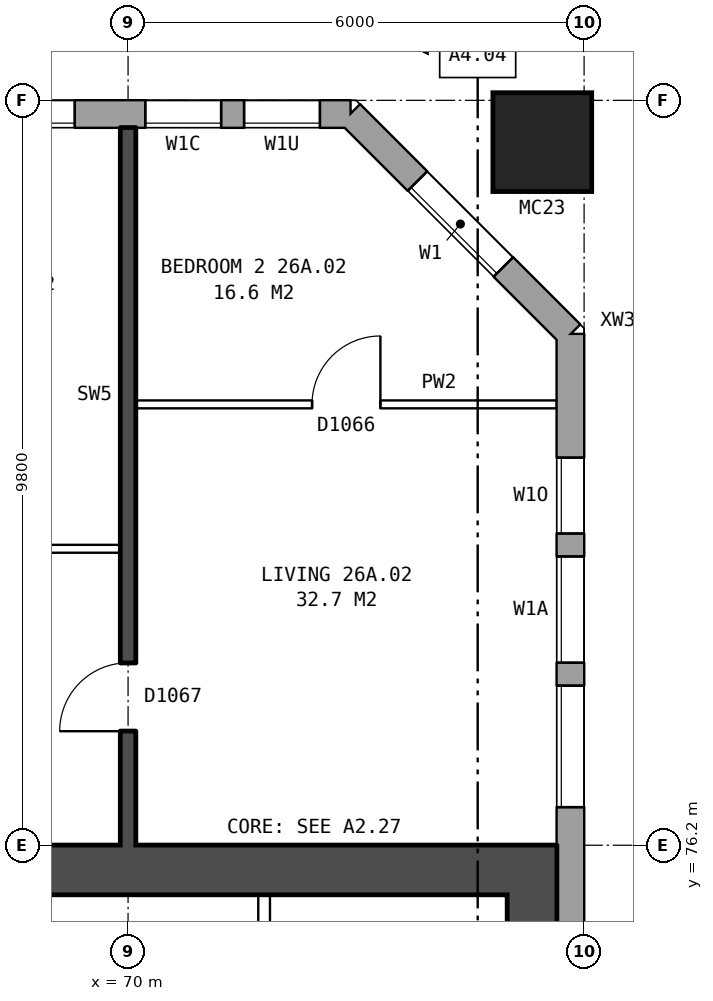
"""IFC4 building model, lengths in metres.
Left out: names, types, materials, properties, quantities, classifications, styles, units other than length and angle.
Written with IfcOpenShell. Run it as: python <this file> out.ifc"""

import sys

from ifc_helpers import new_model, si_unit, direction, frame, frame_2d, origin, origin_2d, place, context, subcontext, project, spatial, rectangle, hollow_rectangle, extrude, element, fill, save


model = new_model("IFC4")
c1 = context("Model", 3, precision=1e-05, world=origin(), true_north=direction((0.0, 1.0)))
c2 = subcontext(c1, "Body", "Model", "MODEL_VIEW")
j1 = project(units=[si_unit("LENGTHUNIT", "METRE"), si_unit("PLANEANGLEUNIT", "RADIAN")], contexts=[c1])
p1 = place(None, origin())
s1 = spatial("IfcSite", under=j1, at=p1, CompositionType="ELEMENT")
p2 = place(p1, origin())
s2 = spatial("IfcBuilding", under=s1, at=p2, CompositionType="ELEMENT")
p3 = place(p2, frame((0.0, 0.0, 96.4)))
s3 = spatial("IfcBuildingStorey", under=s2, at=p3, CompositionType="ELEMENT", Elevation=96.4)
p4 = place(p3, frame((75.45, 85.45, 0.0), z_axis=(0.0, 0.0, 1.0), x_axis=(1.0, 0.0, 0.0)))
e1 = element("IfcColumn", 1, at=p4, inside=s3, PredefinedType="COLUMN", context=c2, shape_type="SweptSolid", body=[
    extrude(hollow_rectangle(XDim=1.3, YDim=1.3, WallThickness=0.07, at=origin_2d()), origin(), (0.0, 0.0, 1.0), 3.1),
])
p5 = place(p3, frame((75.82, 57.075, 0.0), z_axis=(0.0, 0.0, 1.0), x_axis=(0.0, 1.0, 0.0)))
e2 = element("IfcWall", 2, at=p5, inside=s3, PredefinedType="STANDARD", context=c2, shape_type="SweptSolid", body=[
    extrude(rectangle(XDim=25.851, YDim=0.36, at=frame_2d((12.925, 0.0))), origin(), (0.0, 0.0, 1.0), 2.85),
])
p6 = place(p5, frame((0.9, 0.0, 0.8)))
e3 = element("IfcOpeningElement", 3, at=p6, cuts=e2, PredefinedType="OPENING", context=c2, shape_type="SweptSolid", body=[
    extrude(rectangle(XDim=1.2, YDim=0.9, at=frame_2d((0.6, 0.45))), frame((0.0, 0.19, 0.0), z_axis=(0.0, -1.0, 0.0), x_axis=(1.0, 0.0, 0.0)), (0.0, 0.0, 1.0), 0.38),
])
p7 = place(p5, frame((4.625, 0.0, 0.8)))
e4 = element("IfcOpeningElement", 4, at=p7, cuts=e2, PredefinedType="OPENING", context=c2, shape_type="SweptSolid", body=[
    extrude(rectangle(XDim=1.6, YDim=1.8, at=frame_2d((0.8, 0.9))), frame((0.0, 0.19, 0.0), z_axis=(0.0, -1.0, 0.0), x_axis=(1.0, 0.0, 0.0)), (0.0, 0.0, 1.0), 0.38),
])
p8 = place(p5, frame((19.625, 0.0, 0.8)))
e5 = element("IfcOpeningElement", 5, at=p8, cuts=e2, PredefinedType="OPENING", context=c2, shape_type="SweptSolid", body=[
    extrude(rectangle(XDim=1.6, YDim=1.8, at=frame_2d((0.8, 0.9))), frame((0.0, 0.19, 0.0), z_axis=(0.0, -1.0, 0.0), x_axis=(1.0, 0.0, 0.0)), (0.0, 0.0, 1.0), 0.38),
])
p9 = place(p5, frame((21.525, 0.0, 0.8)))
e6 = element("IfcOpeningElement", 6, at=p9, cuts=e2, PredefinedType="OPENING", context=c2, shape_type="SweptSolid", body=[
    extrude(rectangle(XDim=1.4, YDim=1.8, at=frame_2d((0.7, 0.9))), frame((0.0, 0.19, 0.0), z_axis=(0.0, -1.0, 0.0), x_axis=(1.0, 0.0, 0.0)), (0.0, 0.0, 1.0), 0.38),
])
p10 = place(p5, frame((2.45, 0.0, 0.8)))
e7 = element("IfcOpeningElement", 7, at=p10, cuts=e2, PredefinedType="OPENING", context=c2, shape_type="SweptSolid", body=[
    extrude(rectangle(XDim=1.2, YDim=1.8, at=frame_2d((0.6, 0.9))), frame((0.0, 0.19, 0.0), z_axis=(0.0, -1.0, 0.0), x_axis=(1.0, 0.0, 0.0)), (0.0, 0.0, 1.0), 0.38),
])
p11 = place(p5, frame((23.225, 0.0, 0.8)))
e8 = element("IfcOpeningElement", 8, at=p11, cuts=e2, PredefinedType="OPENING", context=c2, shape_type="SweptSolid", body=[
    extrude(rectangle(XDim=1.0, YDim=1.2, at=frame_2d((0.5, 0.6))), frame((0.0, 0.19, 0.0), z_axis=(0.0, -1.0, 0.0), x_axis=(1.0, 0.0, 0.0)), (0.0, 0.0, 1.0), 0.38),
])
p12 = place(p3, frame((75.82, 82.925, 0.0), z_axis=(0.0, 0.0, 1.0), x_axis=(-0.707106781187, 0.707106781187, 0.0)))
e9 = element("IfcWall", 9, at=p12, inside=s3, PredefinedType="STANDARD", context=c2, shape_type="SweptSolid", body=[
    extrude(rectangle(XDim=4.094, YDim=0.36, at=frame_2d((2.047, 0.0))), origin(), (0.0, 0.0, 1.0), 2.85),
])
p13 = place(p12, frame((1.247, 0.0, 0.8)))
e10 = element("IfcOpeningElement", 10, at=p13, cuts=e9, PredefinedType="OPENING", context=c2, shape_type="SweptSolid", body=[
    extrude(rectangle(XDim=1.6, YDim=1.8, at=frame_2d((0.8, 0.9))), frame((0.0, 0.19, 0.0), z_axis=(0.0, -1.0, 0.0), x_axis=(1.0, 0.0, 0.0)), (0.0, 0.0, 1.0), 0.38),
])
p14 = place(p3, frame((72.925, 85.82, 0.0), z_axis=(0.0, 0.0, 1.0), x_axis=(-1.0, 0.0, 0.0)))
e11 = element("IfcWall", 11, at=p14, inside=s3, PredefinedType="STANDARD", context=c2, shape_type="SweptSolid", body=[
    extrude(rectangle(XDim=44.851, YDim=0.36, at=frame_2d((22.425, 0.0))), origin(), (0.0, 0.0, 1.0), 2.85),
])
p15 = place(p14, frame((0.4, 0.0, 0.8)))
e12 = element("IfcOpeningElement", 12, at=p15, cuts=e11, PredefinedType="OPENING", context=c2, shape_type="SweptSolid", body=[
    extrude(rectangle(XDim=1.0, YDim=0.9, at=frame_2d((0.5, 0.45))), frame((0.0, 0.19, 0.0), z_axis=(0.0, -1.0, 0.0), x_axis=(1.0, 0.0, 0.0)), (0.0, 0.0, 1.0), 0.38),
])
p16 = place(p14, frame((3.625, 0.0, 0.8)))
e13 = element("IfcOpeningElement", 13, at=p16, cuts=e11, PredefinedType="OPENING", context=c2, shape_type="SweptSolid", body=[
    extrude(rectangle(XDim=1.6, YDim=1.8, at=frame_2d((0.8, 0.9))), frame((0.0, 0.19, 0.0), z_axis=(0.0, -1.0, 0.0), x_axis=(1.0, 0.0, 0.0)), (0.0, 0.0, 1.0), 0.38),
])
p17 = place(p14, frame((6.625, 0.0, 0.8)))
e14 = element("IfcOpeningElement", 14, at=p17, cuts=e11, PredefinedType="OPENING", context=c2, shape_type="SweptSolid", body=[
    extrude(rectangle(XDim=1.6, YDim=1.8, at=frame_2d((0.8, 0.9))), frame((0.0, 0.19, 0.0), z_axis=(0.0, -1.0, 0.0), x_axis=(1.0, 0.0, 0.0)), (0.0, 0.0, 1.0), 0.38),
])
p18 = place(p14, frame((9.625, 0.0, 0.8)))
e15 = element("IfcOpeningElement", 15, at=p18, cuts=e11, PredefinedType="OPENING", context=c2, shape_type="SweptSolid", body=[
    extrude(rectangle(XDim=1.6, YDim=1.8, at=frame_2d((0.8, 0.9))), frame((0.0, 0.19, 0.0), z_axis=(0.0, -1.0, 0.0), x_axis=(1.0, 0.0, 0.0)), (0.0, 0.0, 1.0), 0.38),
])
p19 = place(p14, frame((12.625, 0.0, 0.8)))
e16 = element("IfcOpeningElement", 16, at=p19, cuts=e11, PredefinedType="OPENING", context=c2, shape_type="SweptSolid", body=[
    extrude(rectangle(XDim=1.6, YDim=1.8, at=frame_2d((0.8, 0.9))), frame((0.0, 0.19, 0.0), z_axis=(0.0, -1.0, 0.0), x_axis=(1.0, 0.0, 0.0)), (0.0, 0.0, 1.0), 0.38),
])
p20 = place(p14, frame((15.625, 0.0, 0.8)))
e17 = element("IfcOpeningElement", 17, at=p20, cuts=e11, PredefinedType="OPENING", context=c2, shape_type="SweptSolid", body=[
    extrude(rectangle(XDim=1.6, YDim=1.8, at=frame_2d((0.8, 0.9))), frame((0.0, 0.19, 0.0), z_axis=(0.0, -1.0, 0.0), x_axis=(1.0, 0.0, 0.0)), (0.0, 0.0, 1.0), 0.38),
])
p21 = place(p14, frame((18.625, 0.0, 0.8)))
e18 = element("IfcOpeningElement", 18, at=p21, cuts=e11, PredefinedType="OPENING", context=c2, shape_type="SweptSolid", body=[
    extrude(rectangle(XDim=1.6, YDim=1.8, at=frame_2d((0.8, 0.9))), frame((0.0, 0.19, 0.0), z_axis=(0.0, -1.0, 0.0), x_axis=(1.0, 0.0, 0.0)), (0.0, 0.0, 1.0), 0.38),
])
p22 = place(p14, frame((21.625, 0.0, 0.8)))
e19 = element("IfcOpeningElement", 19, at=p22, cuts=e11, PredefinedType="OPENING", context=c2, shape_type="SweptSolid", body=[
    extrude(rectangle(XDim=1.6, YDim=1.8, at=frame_2d((0.8, 0.9))), frame((0.0, 0.19, 0.0), z_axis=(0.0, -1.0, 0.0), x_axis=(1.0, 0.0, 0.0)), (0.0, 0.0, 1.0), 0.38),
])
p23 = place(p14, frame((24.625, 0.0, 0.8)))
e20 = element("IfcOpeningElement", 20, at=p23, cuts=e11, PredefinedType="OPENING", context=c2, shape_type="SweptSolid", body=[
    extrude(rectangle(XDim=1.6, YDim=1.8, at=frame_2d((0.8, 0.9))), frame((0.0, 0.19, 0.0), z_axis=(0.0, -1.0, 0.0), x_axis=(1.0, 0.0, 0.0)), (0.0, 0.0, 1.0), 0.38),
])
p24 = place(p14, frame((27.625, 0.0, 0.8)))
e21 = element("IfcOpeningElement", 21, at=p24, cuts=e11, PredefinedType="OPENING", context=c2, shape_type="SweptSolid", body=[
    extrude(rectangle(XDim=1.6, YDim=1.8, at=frame_2d((0.8, 0.9))), frame((0.0, 0.19, 0.0), z_axis=(0.0, -1.0, 0.0), x_axis=(1.0, 0.0, 0.0)), (0.0, 0.0, 1.0), 0.38),
])
p25 = place(p14, frame((30.625, 0.0, 0.8)))
e22 = element("IfcOpeningElement", 22, at=p25, cuts=e11, PredefinedType="OPENING", context=c2, shape_type="SweptSolid", body=[
    extrude(rectangle(XDim=1.6, YDim=1.8, at=frame_2d((0.8, 0.9))), frame((0.0, 0.19, 0.0), z_axis=(0.0, -1.0, 0.0), x_axis=(1.0, 0.0, 0.0)), (0.0, 0.0, 1.0), 0.38),
])
p26 = place(p14, frame((33.625, 0.0, 0.8)))
e23 = element("IfcOpeningElement", 23, at=p26, cuts=e11, PredefinedType="OPENING", context=c2, shape_type="SweptSolid", body=[
    extrude(rectangle(XDim=1.6, YDim=1.8, at=frame_2d((0.8, 0.9))), frame((0.0, 0.19, 0.0), z_axis=(0.0, -1.0, 0.0), x_axis=(1.0, 0.0, 0.0)), (0.0, 0.0, 1.0), 0.38),
])
p27 = place(p14, frame((36.625, 0.0, 0.8)))
e24 = element("IfcOpeningElement", 24, at=p27, cuts=e11, PredefinedType="OPENING", context=c2, shape_type="SweptSolid", body=[
    extrude(rectangle(XDim=1.6, YDim=1.8, at=frame_2d((0.8, 0.9))), frame((0.0, 0.19, 0.0), z_axis=(0.0, -1.0, 0.0), x_axis=(1.0, 0.0, 0.0)), (0.0, 0.0, 1.0), 0.38),
])
p28 = place(p14, frame((39.625, 0.0, 0.8)))
e25 = element("IfcOpeningElement", 25, at=p28, cuts=e11, PredefinedType="OPENING", context=c2, shape_type="SweptSolid", body=[
    extrude(rectangle(XDim=1.6, YDim=1.8, at=frame_2d((0.8, 0.9))), frame((0.0, 0.19, 0.0), z_axis=(0.0, -1.0, 0.0), x_axis=(1.0, 0.0, 0.0)), (0.0, 0.0, 1.0), 0.38),
])
p29 = place(p14, frame((41.525, 0.0, 0.8)))
e26 = element("IfcOpeningElement", 26, at=p29, cuts=e11, PredefinedType="OPENING", context=c2, shape_type="SweptSolid", body=[
    extrude(rectangle(XDim=1.6, YDim=1.8, at=frame_2d((0.8, 0.9))), frame((0.0, 0.19, 0.0), z_axis=(0.0, -1.0, 0.0), x_axis=(1.0, 0.0, 0.0)), (0.0, 0.0, 1.0), 0.38),
])
p30 = place(p14, frame((1.7, 0.0, 0.8)))
e27 = element("IfcOpeningElement", 27, at=p30, cuts=e11, PredefinedType="OPENING", context=c2, shape_type="SweptSolid", body=[
    extrude(rectangle(XDim=1.0, YDim=1.8, at=frame_2d((0.5, 0.9))), frame((0.0, 0.19, 0.0), z_axis=(0.0, -1.0, 0.0), x_axis=(1.0, 0.0, 0.0)), (0.0, 0.0, 1.0), 0.38),
])
p31 = place(p14, frame((43.425, 0.0, 0.8)))
e28 = element("IfcOpeningElement", 28, at=p31, cuts=e11, PredefinedType="OPENING", context=c2, shape_type="SweptSolid", body=[
    extrude(rectangle(XDim=0.6, YDim=1.2, at=frame_2d((0.3, 0.6))), frame((0.0, 0.19, 0.0), z_axis=(0.0, -1.0, 0.0), x_axis=(1.0, 0.0, 0.0)), (0.0, 0.0, 1.0), 0.38),
])
p32 = place(p3, frame((75.315, 64.45, 0.0), z_axis=(0.0, 0.0, 1.0), x_axis=(0.0, 1.0, 0.0)))
e29 = element("IfcWall", 29, at=p32, inside=s3, PredefinedType="SHEAR", context=c2, shape_type="SweptSolid", body=[
    extrude(rectangle(XDim=11.1, YDim=0.65, at=frame_2d((5.55, 0.0))), origin(), (0.0, 0.0, 1.0), 2.85),
])
p33 = place(p3, frame((66.64, 75.875, 0.0), z_axis=(0.0, 0.0, 1.0), x_axis=(1.0, 0.0, 0.0)))
e30 = element("IfcWall", 30, at=p33, inside=s3, PredefinedType="SHEAR", context=c2, shape_type="SweptSolid", body=[
    extrude(rectangle(XDim=9.0, YDim=0.65, at=frame_2d((4.5, 0.0))), origin(), (0.0, 0.0, 1.0), 2.85),
])
p34 = place(p3, frame((71.79, 73.45, 0.0), z_axis=(0.0, 0.0, 1.0), x_axis=(0.0, 1.0, 0.0)))
e31 = element("IfcWall", 31, at=p34, inside=s3, PredefinedType="PARTITIONING", context=c2, shape_type="SweptSolid", body=[
    extrude(rectangle(XDim=2.1, YDim=0.15, at=frame_2d((1.05, 0.0))), origin(), (0.0, 0.0, 1.0), 2.85),
])
p35 = place(p34, frame((0.625, 0.0, 0.0)))
e32 = element("IfcOpeningElement", 32, at=p35, cuts=e31, PredefinedType="OPENING", context=c2, shape_type="SweptSolid", body=[
    extrude(rectangle(XDim=0.85, YDim=2.1, at=frame_2d((0.425, 1.05))), frame((0.0, 0.085, 0.0), z_axis=(0.0, -1.0, 0.0), x_axis=(1.0, 0.0, 0.0)), (0.0, 0.0, 1.0), 0.17),
])
p36 = place(p3, frame((64.1, 80.1, 0.0), z_axis=(0.0, 0.0, 1.0), x_axis=(1.0, 0.0, 0.0)))
e33 = element("IfcWall", 33, at=p36, inside=s3, PredefinedType="PARTITIONING", context=c2, shape_type="SweptSolid", body=[
    extrude(rectangle(XDim=5.8, YDim=0.1, at=frame_2d((2.9, 0.0))), origin(), (0.0, 0.0, 1.0), 2.85),
])
p37 = place(p36, frame((3.6, 0.0, 0.0)))
e34 = element("IfcOpeningElement", 34, at=p37, cuts=e33, PredefinedType="OPENING", context=c2, shape_type="SweptSolid", body=[
    extrude(rectangle(XDim=0.9, YDim=2.1, at=frame_2d((0.45, 1.05))), frame((0.0, 0.06, 0.0), z_axis=(0.0, -1.0, 0.0), x_axis=(1.0, 0.0, 0.0)), (0.0, 0.0, 1.0), 0.12),
])
p38 = place(p36, frame((0.7, 0.0, 0.0)))
e35 = element("IfcOpeningElement", 35, at=p38, cuts=e33, PredefinedType="OPENING", context=c2, shape_type="SweptSolid", body=[
    extrude(rectangle(XDim=0.9, YDim=2.1, at=frame_2d((0.45, 1.05))), frame((0.0, 0.06, 0.0), z_axis=(0.0, -1.0, 0.0), x_axis=(1.0, 0.0, 0.0)), (0.0, 0.0, 1.0), 0.12),
])
p39 = place(p3, frame((70.1, 82.0, 0.0), z_axis=(0.0, 0.0, 1.0), x_axis=(1.0, 0.0, 0.0)))
e36 = element("IfcWall", 36, at=p39, inside=s3, PredefinedType="PARTITIONING", context=c2, shape_type="SweptSolid", body=[
    extrude(rectangle(XDim=5.54, YDim=0.1, at=frame_2d((2.77, 0.0))), origin(), (0.0, 0.0, 1.0), 2.85),
])
p40 = place(p39, frame((2.32, 0.0, 0.0)))
e37 = element("IfcOpeningElement", 37, at=p40, cuts=e36, PredefinedType="OPENING", context=c2, shape_type="SweptSolid", body=[
    extrude(rectangle(XDim=0.9, YDim=2.1, at=frame_2d((0.45, 1.05))), frame((0.0, 0.06, 0.0), z_axis=(0.0, -1.0, 0.0), x_axis=(1.0, 0.0, 0.0)), (0.0, 0.0, 1.0), 0.12),
])
p41 = place(p3, frame((70.0, 76.2, 0.0), z_axis=(0.0, 0.0, 1.0), x_axis=(0.0, 1.0, 0.0)))
e38 = element("IfcWall", 38, at=p41, inside=s3, PredefinedType="SOLIDWALL", context=c2, shape_type="SweptSolid", body=[
    extrude(rectangle(XDim=9.44, YDim=0.2, at=frame_2d((4.72, 0.0))), origin(), (0.0, 0.0, 1.0), 2.85),
])
p42 = place(p41, frame((1.5, 0.0, 0.0)))
e39 = element("IfcOpeningElement", 39, at=p42, cuts=e38, PredefinedType="OPENING", context=c2, shape_type="SweptSolid", body=[
    extrude(rectangle(XDim=0.9, YDim=2.1, at=frame_2d((0.45, 1.05))), frame((0.0, 0.11, 0.0), z_axis=(0.0, -1.0, 0.0), x_axis=(1.0, 0.0, 0.0)), (0.0, 0.0, 1.0), 0.22),
])
p43 = place(p8, origin())
e40 = element("IfcWindow", 40, at=p43, inside=s3, PartitioningType="SINGLE_PANEL", PredefinedType="WINDOW", context=c2, shape_type="SweptSolid", body=[
    extrude(rectangle(XDim=1.6, YDim=1.8, at=frame_2d((0.8, 0.9))), frame((0.0, 0.15, 0.0), z_axis=(0.0, -1.0, 0.0), x_axis=(1.0, 0.0, 0.0)), (0.0, 0.0, 1.0), 0.06),
])
fill(e5, e40)
p44 = place(p9, origin())
e41 = element("IfcWindow", 41, at=p44, inside=s3, PartitioningType="SINGLE_PANEL", PredefinedType="WINDOW", context=c2, shape_type="SweptSolid", body=[
    extrude(rectangle(XDim=1.4, YDim=1.8, at=frame_2d((0.7, 0.9))), frame((0.0, 0.15, 0.0), z_axis=(0.0, -1.0, 0.0), x_axis=(1.0, 0.0, 0.0)), (0.0, 0.0, 1.0), 0.06),
])
fill(e6, e41)
p45 = place(p13, origin())
e42 = element("IfcWindow", 42, at=p45, inside=s3, PartitioningType="SINGLE_PANEL", PredefinedType="WINDOW", context=c2, shape_type="SweptSolid", body=[
    extrude(rectangle(XDim=1.6, YDim=1.8, at=frame_2d((0.8, 0.9))), frame((0.0, 0.15, 0.0), z_axis=(0.0, -1.0, 0.0), x_axis=(1.0, 0.0, 0.0)), (0.0, 0.0, 1.0), 0.06),
])
fill(e10, e42)
p46 = place(p15, origin())
e43 = element("IfcWindow", 43, at=p46, inside=s3, PartitioningType="SINGLE_PANEL", PredefinedType="WINDOW", context=c2, shape_type="SweptSolid", body=[
    extrude(rectangle(XDim=1.0, YDim=0.9, at=frame_2d((0.5, 0.45))), frame((0.0, 0.15, 0.0), z_axis=(0.0, -1.0, 0.0), x_axis=(1.0, 0.0, 0.0)), (0.0, 0.0, 1.0), 0.06),
])
fill(e12, e43)
p47 = place(p16, origin())
e44 = element("IfcWindow", 44, at=p47, inside=s3, PartitioningType="SINGLE_PANEL", PredefinedType="WINDOW", context=c2, shape_type="SweptSolid", body=[
    extrude(rectangle(XDim=1.6, YDim=1.8, at=frame_2d((0.8, 0.9))), frame((0.0, 0.15, 0.0), z_axis=(0.0, -1.0, 0.0), x_axis=(1.0, 0.0, 0.0)), (0.0, 0.0, 1.0), 0.06),
])
fill(e13, e44)
p48 = place(p40, origin())
e45 = element("IfcDoor", 45, at=p48, inside=s3, OperationType="SINGLE_SWING_RIGHT", PredefinedType="DOOR", context=c2, shape_type="SweptSolid", body=[
    extrude(rectangle(XDim=0.9, YDim=2.1, at=frame_2d((0.45, 1.05))), frame((0.0, 0.025, 0.0), z_axis=(0.0, -1.0, 0.0), x_axis=(1.0, 0.0, 0.0)), (0.0, 0.0, 1.0), 0.05),
])
fill(e37, e45)
p49 = place(p42, origin())
e46 = element("IfcDoor", 46, at=p49, inside=s3, OperationType="SINGLE_SWING_LEFT", PredefinedType="DOOR", context=c2, shape_type="SweptSolid", body=[
    extrude(rectangle(XDim=0.9, YDim=2.1, at=frame_2d((0.45, 1.05))), frame((0.0, 0.025, 0.0), z_axis=(0.0, -1.0, 0.0), x_axis=(1.0, 0.0, 0.0)), (0.0, 0.0, 1.0), 0.05),
])
fill(e39, e46)
p50 = place(p11, origin())
e47 = element("IfcWindow", 47, at=p50, inside=s3, PartitioningType="SINGLE_PANEL", PredefinedType="WINDOW", context=c2, shape_type="SweptSolid", body=[
    extrude(rectangle(XDim=1.0, YDim=1.2, at=frame_2d((0.5, 0.6))), frame((0.0, 0.15, 0.0), z_axis=(0.0, -1.0, 0.0), x_axis=(1.0, 0.0, 0.0)), (0.0, 0.0, 1.0), 0.06),
])
fill(e8, e47)
p51 = place(p30, origin())
e48 = element("IfcWindow", 48, at=p51, inside=s3, PartitioningType="SINGLE_PANEL", PredefinedType="WINDOW", context=c2, shape_type="SweptSolid", body=[
    extrude(rectangle(XDim=1.0, YDim=1.8, at=frame_2d((0.5, 0.9))), frame((0.0, 0.15, 0.0), z_axis=(0.0, -1.0, 0.0), x_axis=(1.0, 0.0, 0.0)), (0.0, 0.0, 1.0), 0.06),
])
fill(e27, e48)
save(model, sys.argv[1])
